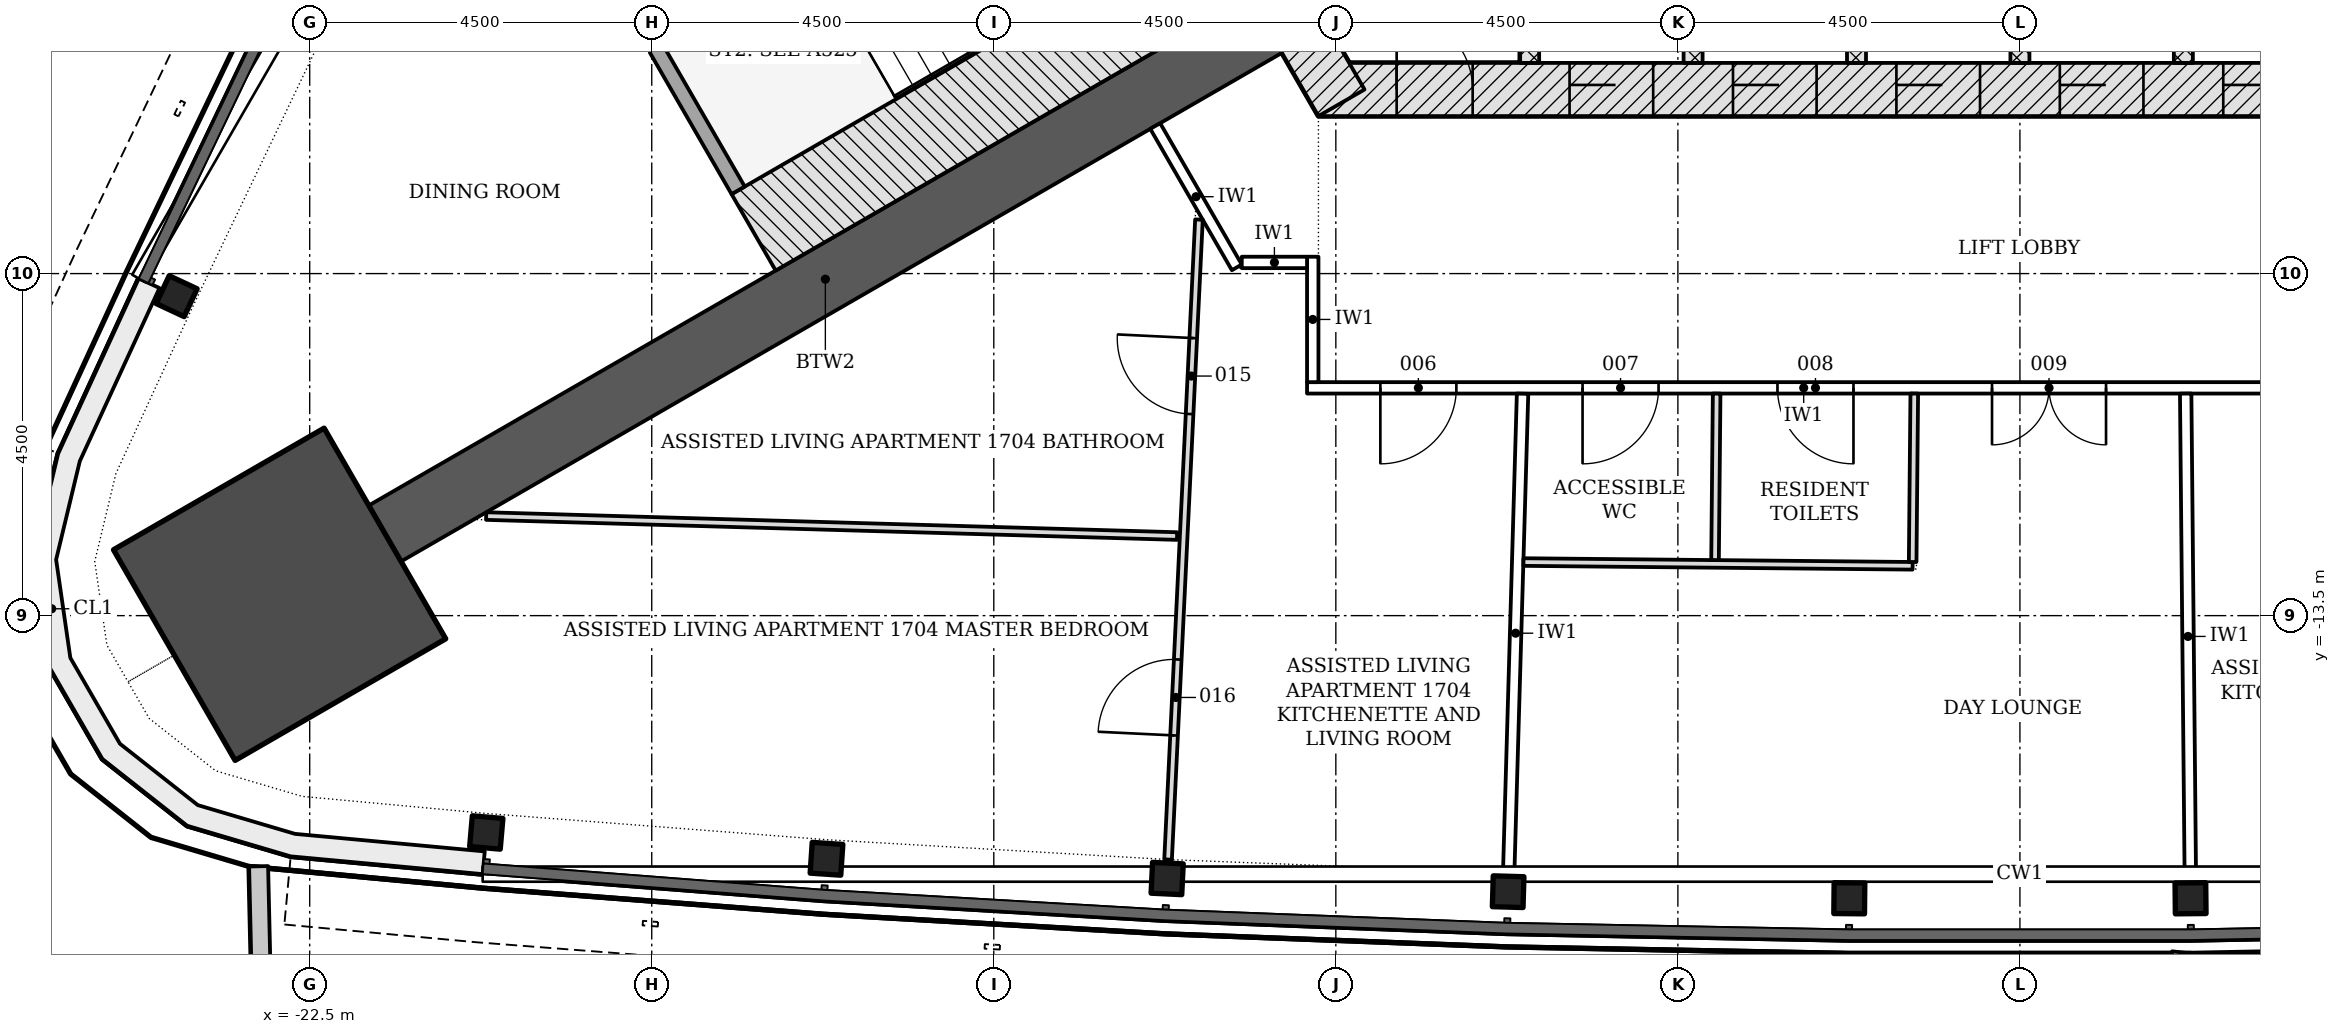
"""IFC4 building model, lengths in metres.
Left out: names, types, materials, properties, quantities, classifications, styles, units other than length and angle.
Written with IfcOpenShell. Run it as: python <this file> out.ifc"""

import sys

from ifc_helpers import new_model, si_unit, direction, frame, frame_2d, origin, origin_2d, place, context, subcontext, project, spatial, polyline, rectangle, i_section, outline, extrude, element, fill, save


model = new_model("IFC4")
c1 = context("Model", 3, precision=1e-05, world=origin(), true_north=direction((0.0, 1.0)))
c2 = subcontext(c1, "Body", "Model", "MODEL_VIEW")
j1 = project(units=[si_unit("LENGTHUNIT", "METRE"), si_unit("PLANEANGLEUNIT", "RADIAN")], contexts=[c1])
p1 = place(None, origin())
s1 = spatial("IfcSite", under=j1, at=p1, CompositionType="ELEMENT")
p2 = place(p1, origin())
s2 = spatial("IfcBuilding", under=s1, at=p2, CompositionType="ELEMENT")
p3 = place(p2, frame((0.0, 0.0, 69.0)))
s3 = spatial("IfcBuildingStorey", under=s2, at=p3, CompositionType="ELEMENT", Elevation=69.0)
p4 = place(p3, frame((-9.229, -6.578, -0.2), z_axis=(0.0, 0.0, 1.0), x_axis=(1.0, 0.0, 0.0)))
e1 = element("IfcWall", 1, at=p4, inside=s3, PredefinedType="SHEAR", context=c2, shape_type="SweptSolid", body=[
    extrude(rectangle(XDim=18.458, YDim=0.7, at=frame_2d((9.229, 0.0))), origin(), (0.0, 0.0, 1.0), 3.6),
])
p5 = place(p4, frame((3.304, 0.0, 0.2)))
e2 = element("IfcOpeningElement", 2, at=p5, cuts=e1, PredefinedType="OPENING", context=c2, shape_type="SweptSolid", body=[
    extrude(rectangle(XDim=1.1, YDim=2.1, at=frame_2d((0.55, 1.05))), frame((0.0, 0.36, 0.0), z_axis=(0.0, -1.0, 0.0), x_axis=(1.0, 0.0, 0.0)), (0.0, 0.0, 1.0), 0.72),
])
p6 = place(p4, frame((5.454, 0.0, 0.2)))
e3 = element("IfcOpeningElement", 3, at=p6, cuts=e1, PredefinedType="OPENING", context=c2, shape_type="SweptSolid", body=[
    extrude(rectangle(XDim=1.1, YDim=2.1, at=frame_2d((0.55, 1.05))), frame((0.0, 0.36, 0.0), z_axis=(0.0, -1.0, 0.0), x_axis=(1.0, 0.0, 0.0)), (0.0, 0.0, 1.0), 0.72),
])
p7 = place(p4, frame((7.604, 0.0, 0.2)))
e4 = element("IfcOpeningElement", 4, at=p7, cuts=e1, PredefinedType="OPENING", context=c2, shape_type="SweptSolid", body=[
    extrude(rectangle(XDim=1.1, YDim=2.1, at=frame_2d((0.55, 1.05))), frame((0.0, 0.36, 0.0), z_axis=(0.0, -1.0, 0.0), x_axis=(1.0, 0.0, 0.0)), (0.0, 0.0, 1.0), 0.72),
])
p8 = place(p4, frame((9.754, 0.0, 0.2)))
e5 = element("IfcOpeningElement", 5, at=p8, cuts=e1, PredefinedType="OPENING", context=c2, shape_type="SweptSolid", body=[
    extrude(rectangle(XDim=1.1, YDim=2.1, at=frame_2d((0.55, 1.05))), frame((0.0, 0.36, 0.0), z_axis=(0.0, -1.0, 0.0), x_axis=(1.0, 0.0, 0.0)), (0.0, 0.0, 1.0), 0.72),
])
p9 = place(p4, frame((11.904, 0.0, 0.2)))
e6 = element("IfcOpeningElement", 6, at=p9, cuts=e1, PredefinedType="OPENING", context=c2, shape_type="SweptSolid", body=[
    extrude(rectangle(XDim=1.1, YDim=2.1, at=frame_2d((0.55, 1.05))), frame((0.0, 0.36, 0.0), z_axis=(0.0, -1.0, 0.0), x_axis=(1.0, 0.0, 0.0)), (0.0, 0.0, 1.0), 0.72),
])
p10 = place(p4, frame((14.054, 0.0, 0.2)))
e7 = element("IfcOpeningElement", 7, at=p10, cuts=e1, PredefinedType="OPENING", context=c2, shape_type="SweptSolid", body=[
    extrude(rectangle(XDim=1.1, YDim=2.1, at=frame_2d((0.55, 1.05))), frame((0.0, 0.36, 0.0), z_axis=(0.0, -1.0, 0.0), x_axis=(1.0, 0.0, 0.0)), (0.0, 0.0, 1.0), 0.72),
])
p11 = place(p4, frame((1.029, 0.0, 0.2)))
e8 = element("IfcOpeningElement", 8, at=p11, cuts=e1, PredefinedType="OPENING", context=c2, shape_type="SweptSolid", body=[
    extrude(rectangle(XDim=1.0, YDim=2.1, at=frame_2d((0.5, 1.05))), frame((0.0, 0.36, 0.0), z_axis=(0.0, -1.0, 0.0), x_axis=(1.0, 0.0, 0.0)), (0.0, 0.0, 1.0), 0.72),
])
p12 = place(p3, frame((-10.311, -4.353, -0.2), z_axis=(0.0, 0.0, 1.0), x_axis=(0.500042739161, -0.866000726912, 0.0)))
e9 = element("IfcWall", 9, at=p12, inside=s3, PredefinedType="SHEAR", context=c2, shape_type="SweptSolid", body=[
    extrude(rectangle(XDim=2.771, YDim=0.7, at=frame_2d((1.386, 0.0))), origin(), (0.0, 0.0, 1.0), 3.6),
])
p13 = place(p3, frame((-9.922, -5.728, -0.2), z_axis=(0.0, 0.0, 1.0), x_axis=(-0.866026077102, -0.499998833779, 0.0)))
e10 = element("IfcWall", 10, at=p13, inside=s3, PredefinedType="SHEAR", context=c2, shape_type="SweptSolid", body=[
    extrude(rectangle(XDim=13.381, YDim=0.85, at=frame_2d((6.691, 0.0))), origin(), (0.0, 0.0, 1.0), 3.6),
])
p14 = place(p3, frame((-22.896, -13.219, -0.2), z_axis=(0.0, 0.0, 1.0), x_axis=(-0.866025403784, -0.5, 0.0)))
e11 = element("IfcColumn", 11, at=p14, inside=s3, PredefinedType="COLUMN", context=c2, shape_type="SweptSolid", body=[
    extrude(rectangle(XDim=3.2, YDim=3.2, at=origin_2d()), origin(), (0.0, 0.0, 1.0), 3.6),
])
for number, where, z_axis, x_axis in (
    (12, (-24.25, -9.297, -0.2), (0.0, 0.0, 1.0), (-0.423, -0.906, 0.0)),
    (13, (-20.177, -16.353, -0.2), (0.0, 0.0, 1.0), (0.996, -0.087, 0.0)),
    (14, (-15.701, -16.699, -0.2), (0.0, 0.0, 1.0), (0.998, -0.067, 0.0)),
    (15, (-11.219, -16.958, -0.2), (0.0, 0.0, 1.0), (0.999, -0.048, 0.0)),
    (16, (-6.733, -17.132, -0.2), (0.0, 0.0, 1.0), (1.0, -0.029, 0.0)),
    (17, (-2.245, -17.218, -0.2), (0.0, 0.0, 1.0), (1.0, -0.01, 0.0)),
    (18, (2.245, -17.218, -0.2), (0.0, 0.0, 1.0), (1.0, 0.01, 0.0)),
):
    element("IfcColumn", number, at=place(p3, frame(where, z_axis=z_axis, x_axis=x_axis)), inside=s3, PredefinedType="COLUMN", context=c2, shape_type="SweptSolid", body=[
        extrude(i_section(OverallWidth=0.404, OverallDepth=0.406, WebThickness=0.027, FlangeThickness=0.044, FilletRadius=0.015, at=origin_2d()), origin(), (0.0, 0.0, 1.0), 3.6),
    ])
p15 = place(p3, origin())
e19 = element("IfcWall", 19, at=p15, inside=s3, PredefinedType="NOTDEFINED", context=c2, shape_type="SweptSolid", body=[
    extrude(outline(polyline([(-24.749, -9.065), (-25.809, -11.369), (-26.141, -12.75), (-25.938, -14.155), (-25.228, -15.385), (-24.112, -16.264), (-22.75, -16.667), (-20.225, -16.901), (-20.197, -16.602), (-22.693, -16.371), (-23.972, -15.993), (-24.997, -15.185), (-25.649, -14.055), (-25.836, -12.764), (-25.524, -11.468), (-24.476, -9.19), (-24.749, -9.065)])), origin(), (0.0, 0.0, 1.0), 3.3),
])
p16 = place(p3, origin())
e20 = element("IfcWall", 20, at=p16, inside=s3, PredefinedType="PARAPET", context=c2, shape_type="SweptSolid", body=[
    extrude(outline(polyline([(-23.297, -16.8), (-23.231, -19.671), (-22.779, -22.472), (-21.955, -25.119), (-20.783, -27.53), (-19.3, -29.632), (-17.55, -31.361), (-15.586, -32.666), (-13.469, -33.506), (-11.262, -33.856), (-9.032, -33.705), (-6.848, -33.057), (-4.776, -31.933), (-2.878, -30.367), (-1.213, -28.406), (0.17, -26.109), (1.227, -23.547), (1.928, -20.798), (2.25, -17.944), (2.001, -17.916), (1.681, -20.753), (0.989, -23.468), (-0.054, -25.996), (-1.417, -28.259), (-3.054, -30.188), (-4.917, -31.725), (-6.944, -32.825), (-9.077, -33.457), (-11.25, -33.604), (-13.402, -33.263), (-15.469, -32.443), (-17.391, -31.167), (-19.108, -29.469), (-20.567, -27.402), (-21.722, -25.026), (-22.535, -22.415), (-22.982, -19.648), (-23.047, -16.795), (-23.297, -16.8)])), origin(), (0.0, 0.0, 1.0), 1.1),
])
for number, where, z_axis, x_axis in (
    (21, (-6.45, -6.228, -0.2), (0.0, 0.0, 1.0), (0.0, 1.0, 0.0)),
    (22, (-4.3, -6.228, -0.2), (0.0, 0.0, 1.0), (0.0, 1.0, 0.0)),
    (23, (-2.15, -6.228, -0.2), (0.0, 0.0, 1.0), (0.0, 1.0, 0.0)),
    (24, (0.0, -6.228, -0.2), (0.0, 0.0, 1.0), (0.0, 1.0, 0.0)),
    (25, (2.15, -6.228, -0.2), (0.0, 0.0, 1.0), (0.0, 1.0, 0.0)),
):
    element("IfcWall", number, at=place(p3, frame(where, z_axis=z_axis, x_axis=x_axis)), inside=s3, PredefinedType="PARTITIONING", context=c2, shape_type="SweptSolid", body=[
        extrude(rectangle(XDim=2.5, YDim=0.25, at=frame_2d((1.25, 0.0))), origin(), (0.0, 0.0, 1.0), 3.6),
    ])
p17 = place(p3, frame((-10.424, -4.858, -0.2), z_axis=(0.0, 0.0, 1.0), x_axis=(-0.866033125095, -0.499986626058, 0.0)))
e26 = element("IfcWall", 26, at=p17, inside=s3, PredefinedType="SHEAR", context=c2, shape_type="SweptSolid", body=[
    extrude(rectangle(XDim=7.2, YDim=1.161, at=frame_2d((3.6, 0.0))), origin(), (0.0, 0.0, 1.0), 3.6),
])
p18 = place(p3, frame((0.0, 0.0, -0.2)))
e27 = element("IfcWall", 27, at=p18, inside=s3, PredefinedType="SHEAR", context=c2, shape_type="SweptSolid", body=[
    extrude(outline(polyline([(-17.439, -3.907), (-18.025, -6.093), (-16.95, -7.955), (-16.777, -7.855), (-17.81, -6.065), (-17.267, -4.039), (-17.339, -4.081), (-17.339, -4.081), (-17.339, -4.081), (-17.339, -4.081), (-17.339, -4.081), (-17.339, -4.081), (-17.339, -4.081), (-17.339, -4.081), (-17.339, -4.081), (-17.339, -4.081), (-17.339, -4.081), (-17.339, -4.081), (-17.339, -4.081), (-17.339, -4.081), (-17.339, -4.081), (-17.339, -4.081), (-17.339, -4.081), (-17.439, -3.907)])), origin(), (0.0, 0.0, 1.0), 3.6),
])
p19 = place(p3, frame((3.689, -10.503, 0.0), z_axis=(0.0, 0.0, 1.0), x_axis=(-1.0, 0.0, 0.0)))
e28 = element("IfcWall", 28, at=p19, inside=s3, PredefinedType="PARTITIONING", context=c2, shape_type="SweptSolid", body=[
    extrude(rectangle(XDim=13.068, YDim=0.15, at=frame_2d((6.534, 0.0))), origin(), (0.0, 0.0, 1.0), 2.778),
])
p20 = place(p19, frame((11.103, 0.0, 0.0)))
e29 = element("IfcOpeningElement", 29, at=p20, cuts=e28, PredefinedType="OPENING", context=c2, shape_type="SweptSolid", body=[
    extrude(rectangle(XDim=1.0, YDim=2.1, at=frame_2d((0.5, 1.05))), frame((0.0, 0.085, 0.0), z_axis=(0.0, -1.0, 0.0), x_axis=(1.0, 0.0, 0.0)), (0.0, 0.0, 1.0), 0.17),
])
p21 = place(p19, frame((8.443, 0.0, 0.0)))
e30 = element("IfcOpeningElement", 30, at=p21, cuts=e28, PredefinedType="OPENING", context=c2, shape_type="SweptSolid", body=[
    extrude(rectangle(XDim=1.0, YDim=2.1, at=frame_2d((0.5, 1.05))), frame((0.0, 0.085, 0.0), z_axis=(0.0, -1.0, 0.0), x_axis=(1.0, 0.0, 0.0)), (0.0, 0.0, 1.0), 0.17),
])
p22 = place(p19, frame((5.879, 0.0, 0.0)))
e31 = element("IfcOpeningElement", 31, at=p22, cuts=e28, PredefinedType="OPENING", context=c2, shape_type="SweptSolid", body=[
    extrude(rectangle(XDim=1.0, YDim=2.1, at=frame_2d((0.5, 1.05))), frame((0.0, 0.085, 0.0), z_axis=(0.0, -1.0, 0.0), x_axis=(1.0, 0.0, 0.0)), (0.0, 0.0, 1.0), 0.17),
])
p23 = place(p19, frame((2.556, 0.0, 0.0)))
e32 = element("IfcOpeningElement", 32, at=p23, cuts=e28, PredefinedType="OPENING", context=c2, shape_type="SweptSolid", body=[
    extrude(rectangle(XDim=1.5, YDim=2.1, at=frame_2d((0.75, 1.05))), frame((0.0, 0.085, 0.0), z_axis=(0.0, -1.0, 0.0), x_axis=(1.0, 0.0, 0.0)), (0.0, 0.0, 1.0), 0.17),
])
p24 = place(p3, frame((-11.376, -7.059, 0.0), z_axis=(0.0, 0.0, 1.0), x_axis=(0.500076779081, -0.865981070823, 0.0)))
e33 = element("IfcWall", 33, at=p24, inside=s3, PredefinedType="PARTITIONING", context=c2, shape_type="SweptSolid", body=[
    extrude(rectangle(XDim=2.147, YDim=0.15, at=frame_2d((1.074, 0.0))), origin(), (0.0, 0.0, 1.0), 2.778),
])
p25 = place(p3, frame((-9.304, -10.428, 0.0), z_axis=(0.0, 0.0, 1.0), x_axis=(0.0, 1.0, 0.0)))
e34 = element("IfcWall", 34, at=p25, inside=s3, PredefinedType="PARTITIONING", context=c2, shape_type="SweptSolid", body=[
    extrude(rectangle(XDim=1.65, YDim=0.15, at=frame_2d((0.825, 0.0))), origin(), (0.0, 0.0, 1.0), 3.4),
])
p26 = place(p3, frame((-10.238, -8.853, 0.0), z_axis=(0.0, 0.0, 1.0), x_axis=(1.0, 0.0, 0.0)))
e35 = element("IfcWall", 35, at=p26, inside=s3, PredefinedType="PARTITIONING", context=c2, shape_type="SweptSolid", body=[
    extrude(rectangle(XDim=0.859, YDim=0.15, at=frame_2d((0.43, 0.0))), origin(), (0.0, 0.0, 1.0), 3.4),
])
p27 = place(p3, frame((2.242, -16.968, 0.0), z_axis=(0.0, 0.0, 1.0), x_axis=(-0.009628532285, 0.999953644609, 0.0)))
e36 = element("IfcWall", 36, at=p27, inside=s3, PredefinedType="PARTITIONING", context=c2, shape_type="SweptSolid", body=[
    extrude(rectangle(XDim=6.39, YDim=0.15, at=frame_2d((3.195, 0.0))), origin(), (0.0, 0.0, 1.0), 2.778),
])
p28 = place(p3, frame((-6.726, -16.882, 0.0), z_axis=(0.0, 0.0, 1.0), x_axis=(0.028929036321, 0.999581467844, 0.0)))
e37 = element("IfcWall", 37, at=p28, inside=s3, PredefinedType="PARTITIONING", context=c2, shape_type="SweptSolid", body=[
    extrude(rectangle(XDim=6.304, YDim=0.15, at=frame_2d((3.152, 0.0))), origin(), (0.0, 0.0, 1.0), 2.778),
])
p29 = place(p3, frame((-11.089, -12.453, 0.0), z_axis=(0.0, 0.0, 1.0), x_axis=(-0.999581884532, 0.028914634982, 0.0)))
e38 = element("IfcWall", 38, at=p29, inside=s3, PredefinedType="PARTITIONING", context=c2, shape_type="SweptSolid", body=[
    extrude(rectangle(XDim=9.094, YDim=0.1, at=frame_2d((4.547, 0.0))), origin(), (0.0, 0.0, 1.0), 2.778),
])
p30 = place(p3, frame((-11.207, -16.709, 0.0), z_axis=(0.0, 0.0, 1.0), x_axis=(0.048196786961, 0.998837859578, 0.0)))
e39 = element("IfcWall", 39, at=p30, inside=s3, PredefinedType="PARTITIONING", context=c2, shape_type="SweptSolid", body=[
    extrude(rectangle(XDim=8.429, YDim=0.1, at=frame_2d((4.214, 0.0))), origin(), (0.0, 0.0, 1.0), 2.778),
])
p31 = place(p30, frame((5.868, 0.0, 0.0)))
e40 = element("IfcOpeningElement", 40, at=p31, cuts=e39, PredefinedType="OPENING", context=c2, shape_type="SweptSolid", body=[
    extrude(rectangle(XDim=1.0, YDim=2.1, at=frame_2d((0.5, 1.05))), frame((0.0, 0.06, 0.0), z_axis=(0.0, -1.0, 0.0), x_axis=(1.0, 0.0, 0.0)), (0.0, 0.0, 1.0), 0.12),
])
p32 = place(p30, frame((1.635, 0.0, 0.0)))
e41 = element("IfcOpeningElement", 41, at=p32, cuts=e39, PredefinedType="OPENING", context=c2, shape_type="SweptSolid", body=[
    extrude(rectangle(XDim=1.0, YDim=2.1, at=frame_2d((0.5, 1.05))), frame((0.0, 0.06, 0.0), z_axis=(0.0, -1.0, 0.0), x_axis=(1.0, 0.0, 0.0)), (0.0, 0.0, 1.0), 0.12),
])
p33 = place(p3, frame((-6.531, -12.795, 0.0), z_axis=(0.0, 0.0, 1.0), x_axis=(0.99995315176, -0.009679580841, 0.0)))
e42 = element("IfcWall", 42, at=p33, inside=s3, PredefinedType="PARTITIONING", context=c2, shape_type="SweptSolid", body=[
    extrude(rectangle(XDim=5.12, YDim=0.1, at=frame_2d((2.56, 0.0))), origin(), (0.0, 0.0, 1.0), 2.778),
])
p34 = place(p3, frame((-1.411, -12.794, 0.0), z_axis=(0.0, 0.0, 1.0), x_axis=(0.009585280215, 0.999954060146, 0.0)))
e43 = element("IfcWall", 43, at=p34, inside=s3, PredefinedType="PARTITIONING", context=c2, shape_type="SweptSolid", body=[
    extrude(rectangle(XDim=2.216, YDim=0.1, at=frame_2d((1.108, 0.0))), origin(), (0.0, 0.0, 1.0), 3.4),
])
p35 = place(p3, frame((-4.011, -12.769, 0.0), z_axis=(0.0, 0.0, 1.0), x_axis=(0.009583868309, 0.99995407368, 0.0)))
e44 = element("IfcWall", 44, at=p35, inside=s3, PredefinedType="PARTITIONING", context=c2, shape_type="SweptSolid", body=[
    extrude(rectangle(XDim=2.191, YDim=0.1, at=frame_2d((1.095, 0.0))), origin(), (0.0, 0.0, 1.0), 3.4),
])
p36 = place(p5, origin())
e45 = element("IfcDoor", 45, at=p36, inside=s3, OperationType="DOUBLE_DOOR_SLIDING", PredefinedType="DOOR", context=c2, shape_type="SweptSolid", body=[
    extrude(rectangle(XDim=1.1, YDim=2.1, at=frame_2d((0.55, 1.05))), frame((0.0, 0.025, 0.0), z_axis=(0.0, -1.0, 0.0), x_axis=(1.0, 0.0, 0.0)), (0.0, 0.0, 1.0), 0.05),
])
fill(e2, e45)
p37 = place(p6, origin())
e46 = element("IfcDoor", 46, at=p37, inside=s3, OperationType="DOUBLE_DOOR_SLIDING", PredefinedType="DOOR", context=c2, shape_type="SweptSolid", body=[
    extrude(rectangle(XDim=1.1, YDim=2.1, at=frame_2d((0.55, 1.05))), frame((0.0, 0.025, 0.0), z_axis=(0.0, -1.0, 0.0), x_axis=(1.0, 0.0, 0.0)), (0.0, 0.0, 1.0), 0.05),
])
fill(e3, e46)
p38 = place(p7, origin())
e47 = element("IfcDoor", 47, at=p38, inside=s3, OperationType="DOUBLE_DOOR_SLIDING", PredefinedType="DOOR", context=c2, shape_type="SweptSolid", body=[
    extrude(rectangle(XDim=1.1, YDim=2.1, at=frame_2d((0.55, 1.05))), frame((0.0, 0.025, 0.0), z_axis=(0.0, -1.0, 0.0), x_axis=(1.0, 0.0, 0.0)), (0.0, 0.0, 1.0), 0.05),
])
fill(e4, e47)
p39 = place(p8, origin())
e48 = element("IfcDoor", 48, at=p39, inside=s3, OperationType="DOUBLE_DOOR_SLIDING", PredefinedType="DOOR", context=c2, shape_type="SweptSolid", body=[
    extrude(rectangle(XDim=1.1, YDim=2.1, at=frame_2d((0.55, 1.05))), frame((0.0, 0.025, 0.0), z_axis=(0.0, -1.0, 0.0), x_axis=(1.0, 0.0, 0.0)), (0.0, 0.0, 1.0), 0.05),
])
fill(e5, e48)
p40 = place(p9, origin())
e49 = element("IfcDoor", 49, at=p40, inside=s3, OperationType="DOUBLE_DOOR_SLIDING", PredefinedType="DOOR", context=c2, shape_type="SweptSolid", body=[
    extrude(rectangle(XDim=1.1, YDim=2.1, at=frame_2d((0.55, 1.05))), frame((0.0, 0.025, 0.0), z_axis=(0.0, -1.0, 0.0), x_axis=(1.0, 0.0, 0.0)), (0.0, 0.0, 1.0), 0.05),
])
fill(e6, e49)
p41 = place(p11, origin())
e50 = element("IfcDoor", 50, at=p41, inside=s3, OperationType="SINGLE_SWING_LEFT", PredefinedType="DOOR", context=c2, shape_type="SweptSolid", body=[
    extrude(rectangle(XDim=1.0, YDim=2.1, at=frame_2d((0.5, 1.05))), frame((0.0, 0.075, 0.0), z_axis=(0.0, -1.0, 0.0), x_axis=(1.0, 0.0, 0.0)), (0.0, 0.0, 1.0), 0.15),
])
fill(e8, e50)
p42 = place(p20, origin())
e51 = element("IfcDoor", 51, at=p42, inside=s3, OperationType="SINGLE_SWING_RIGHT", PredefinedType="DOOR", context=c2, shape_type="SweptSolid", body=[
    extrude(rectangle(XDim=1.0, YDim=2.1, at=frame_2d((0.5, 1.05))), frame((0.0, 0.025, 0.0), z_axis=(0.0, -1.0, 0.0), x_axis=(1.0, 0.0, 0.0)), (0.0, 0.0, 1.0), 0.05),
])
fill(e29, e51)
p43 = place(p21, origin())
e52 = element("IfcDoor", 52, at=p43, inside=s3, OperationType="SINGLE_SWING_RIGHT", PredefinedType="DOOR", context=c2, shape_type="SweptSolid", body=[
    extrude(rectangle(XDim=1.0, YDim=2.1, at=frame_2d((0.5, 1.05))), frame((0.0, 0.025, 0.0), z_axis=(0.0, -1.0, 0.0), x_axis=(1.0, 0.0, 0.0)), (0.0, 0.0, 1.0), 0.05),
])
fill(e30, e52)
p44 = place(p22, origin())
e53 = element("IfcDoor", 53, at=p44, inside=s3, OperationType="SINGLE_SWING_LEFT", PredefinedType="DOOR", context=c2, shape_type="SweptSolid", body=[
    extrude(rectangle(XDim=1.0, YDim=2.1, at=frame_2d((0.5, 1.05))), frame((0.0, 0.025, 0.0), z_axis=(0.0, -1.0, 0.0), x_axis=(1.0, 0.0, 0.0)), (0.0, 0.0, 1.0), 0.05),
])
fill(e31, e53)
p45 = place(p23, origin())
e54 = element("IfcDoor", 54, at=p45, inside=s3, OperationType="DOUBLE_DOOR_SINGLE_SWING", PredefinedType="DOOR", context=c2, shape_type="SweptSolid", body=[
    extrude(rectangle(XDim=1.5, YDim=2.1, at=frame_2d((0.75, 1.05))), frame((0.0, 0.025, 0.0), z_axis=(0.0, -1.0, 0.0), x_axis=(1.0, 0.0, 0.0)), (0.0, 0.0, 1.0), 0.05),
])
fill(e32, e54)
p46 = place(p31, origin())
e55 = element("IfcDoor", 55, at=p46, inside=s3, OperationType="SINGLE_SWING_RIGHT", PredefinedType="DOOR", context=c2, shape_type="SweptSolid", body=[
    extrude(rectangle(XDim=1.0, YDim=2.1, at=frame_2d((0.5, 1.05))), frame((0.0, 0.025, 0.0), z_axis=(0.0, -1.0, 0.0), x_axis=(1.0, 0.0, 0.0)), (0.0, 0.0, 1.0), 0.05),
])
fill(e40, e55)
p47 = place(p32, origin())
e56 = element("IfcDoor", 56, at=p47, inside=s3, OperationType="SINGLE_SWING_LEFT", PredefinedType="DOOR", context=c2, shape_type="SweptSolid", body=[
    extrude(rectangle(XDim=1.0, YDim=2.1, at=frame_2d((0.5, 1.05))), frame((0.0, 0.025, 0.0), z_axis=(0.0, -1.0, 0.0), x_axis=(1.0, 0.0, 0.0)), (0.0, 0.0, 1.0), 0.05),
])
fill(e41, e56)
save(model, sys.argv[1])
